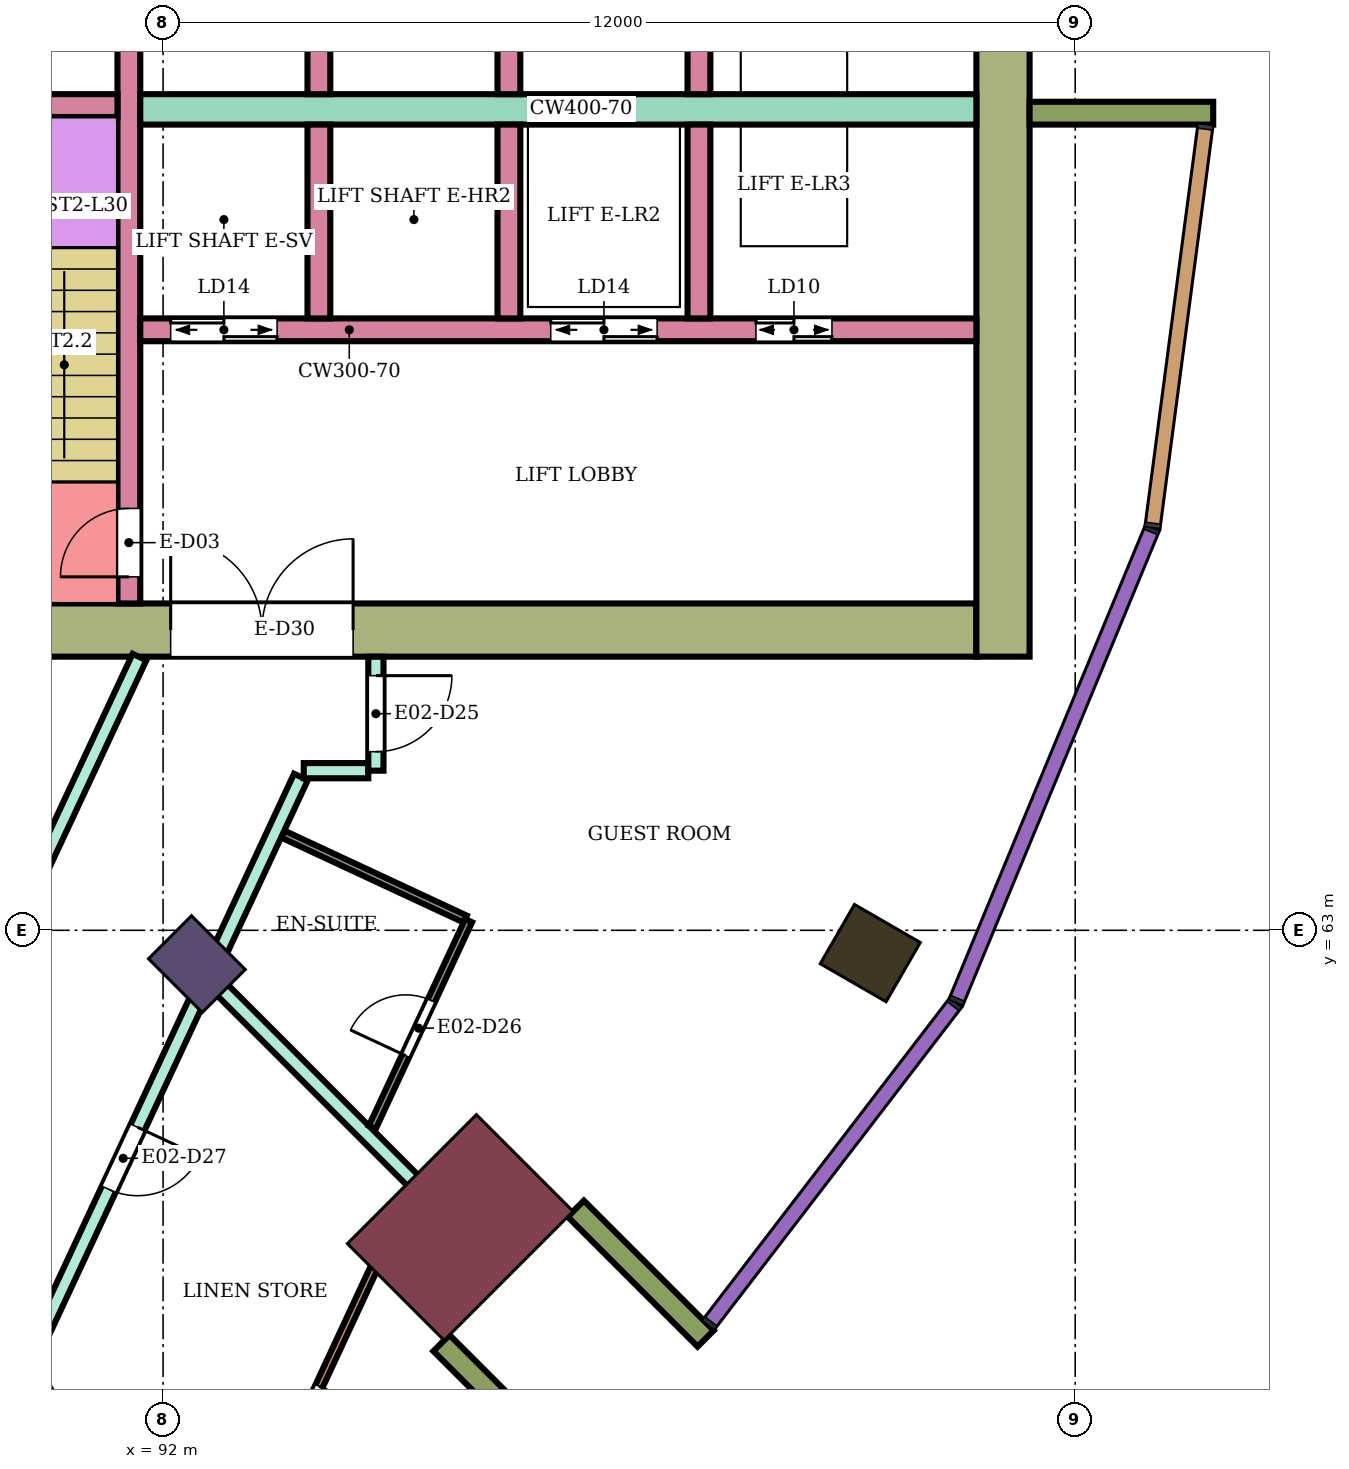
"""IFC4 building model, lengths in metres.
Left out: names, types, materials, properties, quantities, classifications, styles, units other than length and angle.
Written with IfcOpenShell. Run it as: python <this file> out.ifc"""

import sys

from ifc_helpers import new_model, si_unit, direction, frame, frame_2d, origin, origin_2d, place, context, subcontext, project, spatial, rectangle, extrude, element, fill, save


model = new_model("IFC4")
c1 = context("Model", 3, precision=1e-05, world=origin(), true_north=direction((0.0, 1.0)))
c2 = subcontext(c1, "Body", "Model", "MODEL_VIEW")
j1 = project(units=[si_unit("LENGTHUNIT", "METRE"), si_unit("PLANEANGLEUNIT", "RADIAN")], contexts=[c1])
p1 = place(None, origin())
s1 = spatial("IfcSite", under=j1, at=p1, CompositionType="ELEMENT")
p2 = place(p1, origin())
s2 = spatial("IfcBuilding", under=s1, at=p2, CompositionType="ELEMENT")
p3 = place(p2, frame((0.0, 0.0, 130.2)))
s3 = spatial("IfcBuildingStorey", under=s2, at=p3, CompositionType="ELEMENT", Elevation=130.2)
p4 = place(p3, frame((101.304, 62.7, 0.0), z_axis=(0.0, 0.0, 1.0), x_axis=(0.866025403784, -0.5, 0.0)))
e1 = element("IfcColumn", 1, at=p4, inside=s3, PredefinedType="COLUMN", context=c2, shape_type="SweptSolid", body=[
    extrude(rectangle(XDim=1.0, YDim=0.9, at=origin_2d()), origin(), (0.0, 0.0, 1.0), 3.9),
])
p5 = place(p3, frame((92.445, 62.555, 0.0), z_axis=(0.0, 0.0, 1.0), x_axis=(0.707106781187, -0.707106781187, 0.0)))
e2 = element("IfcColumn", 2, at=p5, inside=s3, PredefinedType="COLUMN", context=c2, shape_type="SweptSolid", body=[
    extrude(rectangle(XDim=1.0, YDim=0.8, at=origin_2d()), origin(), (0.0, 0.0, 1.0), 3.9),
])
p6 = place(p3, frame((95.91, 59.09, 0.0), z_axis=(0.0, 0.0, 1.0), x_axis=(0.707106781187, -0.707106781187, 0.0)))
e3 = element("IfcColumn", 3, at=p6, inside=s3, PredefinedType="COLUMN", context=c2, shape_type="SweptSolid", body=[
    extrude(rectangle(XDim=1.8, YDim=2.4, at=origin_2d()), origin(), (0.0, 0.0, 1.0), 3.9),
])
p7 = place(p3, frame((87.9, 66.95, 0.0), z_axis=(0.0, 0.0, 1.0), x_axis=(1.0, 0.0, 0.0)))
e4 = element("IfcWall", 4, at=p7, inside=s3, PredefinedType="SHEAR", context=c2, shape_type="SweptSolid", body=[
    extrude(rectangle(XDim=14.8, YDim=0.7, at=frame_2d((7.4, 0.0))), origin(), (0.0, 0.0, 1.0), 3.58),
])
p8 = place(p7, frame((4.2, 0.0, 0.0)))
e5 = element("IfcOpeningElement", 5, at=p8, cuts=e4, PredefinedType="OPENING", context=c2, shape_type="SweptSolid", body=[
    extrude(rectangle(XDim=2.4, YDim=2.4, at=frame_2d((1.2, 1.2))), frame((0.0, 0.36, 0.0), z_axis=(0.0, -1.0, 0.0), x_axis=(1.0, 0.0, 0.0)), (0.0, 0.0, 1.0), 0.72),
])
p9 = place(p3, frame((103.05, 66.6, 0.0), z_axis=(0.0, 0.0, 1.0), x_axis=(0.0, 1.0, 0.0)))
e6 = element("IfcWall", 6, at=p9, inside=s3, PredefinedType="SHEAR", context=c2, shape_type="SweptSolid", body=[
    extrude(rectangle(XDim=16.8, YDim=0.7, at=frame_2d((8.4, 0.0))), origin(), (0.0, 0.0, 1.0), 3.58),
])
p10 = place(p3, frame((91.55, 67.3, 0.0), z_axis=(0.0, 0.0, 1.0), x_axis=(0.0, 1.0, 0.0)))
e7 = element("IfcWall", 7, at=p10, inside=s3, PredefinedType="SHEAR", context=c2, shape_type="SweptSolid", body=[
    extrude(rectangle(XDim=7.7, YDim=0.3, at=frame_2d((3.85, 0.0))), origin(), (0.0, 0.0, 1.0), 3.58),
])
p11 = place(p10, frame((0.35, 0.0, 0.0)))
e8 = element("IfcOpeningElement", 8, at=p11, cuts=e7, PredefinedType="OPENING", context=c2, shape_type="SweptSolid", body=[
    extrude(rectangle(XDim=0.9, YDim=2.1, at=frame_2d((0.45, 1.05))), frame((0.0, 0.16, 0.0), z_axis=(0.0, -1.0, 0.0), x_axis=(1.0, 0.0, 0.0)), (0.0, 0.0, 1.0), 0.32),
])
p12 = place(p3, frame((88.35, 73.85, 0.0), z_axis=(0.0, 0.0, 1.0), x_axis=(1.0, 0.0, 0.0)))
e9 = element("IfcWall", 9, at=p12, inside=s3, PredefinedType="SHEAR", context=c2, shape_type="SweptSolid", body=[
    extrude(rectangle(XDim=3.05, YDim=0.3, at=frame_2d((1.525, 0.0))), origin(), (0.0, 0.0, 1.0), 3.58),
])
p13 = place(p3, frame((91.7, 73.8, 0.0), z_axis=(0.0, 0.0, 1.0), x_axis=(1.0, 0.0, 0.0)))
e10 = element("IfcWall", 10, at=p13, inside=s3, PredefinedType="SHEAR", context=c2, shape_type="SweptSolid", body=[
    extrude(rectangle(XDim=11.0, YDim=0.4, at=frame_2d((5.5, 0.0))), origin(), (0.0, 0.0, 1.0), 3.58),
])
p14 = place(p3, frame((91.7, 70.9, 0.0), z_axis=(0.0, 0.0, 1.0), x_axis=(1.0, 0.0, 0.0)))
e11 = element("IfcWall", 11, at=p14, inside=s3, PredefinedType="SHEAR", context=c2, shape_type="SweptSolid", body=[
    extrude(rectangle(XDim=11.0, YDim=0.3, at=frame_2d((5.5, 0.0))), origin(), (0.0, 0.0, 1.0), 3.58),
])
p15 = place(p14, frame((0.4, 0.0, 0.0)))
e12 = element("IfcOpeningElement", 12, at=p15, cuts=e11, PredefinedType="OPENING", context=c2, shape_type="SweptSolid", body=[
    extrude(rectangle(XDim=1.4, YDim=2.1, at=frame_2d((0.7, 1.05))), frame((0.0, 0.16, 0.0), z_axis=(0.0, -1.0, 0.0), x_axis=(1.0, 0.0, 0.0)), (0.0, 0.0, 1.0), 0.32),
])
p16 = place(p14, frame((5.4, 0.0, 0.0)))
e13 = element("IfcOpeningElement", 13, at=p16, cuts=e11, PredefinedType="OPENING", context=c2, shape_type="SweptSolid", body=[
    extrude(rectangle(XDim=1.4, YDim=2.1, at=frame_2d((0.7, 1.05))), frame((0.0, 0.16, 0.0), z_axis=(0.0, -1.0, 0.0), x_axis=(1.0, 0.0, 0.0)), (0.0, 0.0, 1.0), 0.32),
])
p17 = place(p14, frame((8.1, 0.0, 0.0)))
e14 = element("IfcOpeningElement", 14, at=p17, cuts=e11, PredefinedType="OPENING", context=c2, shape_type="SweptSolid", body=[
    extrude(rectangle(XDim=1.0, YDim=2.1, at=frame_2d((0.5, 1.05))), frame((0.0, 0.16, 0.0), z_axis=(0.0, -1.0, 0.0), x_axis=(1.0, 0.0, 0.0)), (0.0, 0.0, 1.0), 0.32),
])
for number, where, z_axis, x_axis in (
    (15, (94.05, 74.0, 0.0), (0.0, 0.0, 1.0), (0.0, 1.0, 0.0)),
    (16, (96.55, 74.0, 0.0), (0.0, 0.0, 1.0), (0.0, 1.0, 0.0)),
    (17, (99.05, 74.0, 0.0), (0.0, 0.0, 1.0), (0.0, 1.0, 0.0)),
    (18, (94.05, 71.05, 0.0), (0.0, 0.0, 1.0), (0.0, 1.0, 0.0)),
    (19, (96.55, 71.05, 0.0), (0.0, 0.0, 1.0), (0.0, 1.0, 0.0)),
    (20, (99.05, 71.05, 0.0), (0.0, 0.0, 1.0), (0.0, 1.0, 0.0)),
):
    element("IfcWall", number, at=place(p3, frame(where, z_axis=z_axis, x_axis=x_axis)), inside=s3, PredefinedType="SHEAR", context=c2, shape_type="SweptSolid", body=[
        extrude(rectangle(XDim=2.55, YDim=0.3, at=frame_2d((1.275, 0.0))), origin(), (0.0, 0.0, 1.0), 3.58),
    ])
for number, where, z_axis, x_axis in (
    (21, (103.4, 73.75, 0.0), (0.0, 0.0, 1.0), (1.0, 0.0, 0.0)),
    (22, (95.662, 57.57, 0.0), (0.0, 0.0, 1.0), (0.707, -0.707, 0.0)),
    (23, (97.43, 59.338, 0.0), (0.0, 0.0, 1.0), (0.707, -0.707, 0.0)),
):
    element("IfcWall", number, at=place(p3, frame(where, z_axis=z_axis, x_axis=x_axis)), inside=s3, PredefinedType="NOTDEFINED", context=c2, shape_type="SweptSolid", body=[
        extrude(rectangle(XDim=2.416, YDim=0.3, at=frame_2d((1.208, 0.0))), origin(), (0.0, 0.0, 1.0), 3.9),
    ])
p18 = place(p3, frame((88.502, 59.774, 0.0), z_axis=(0.0, 0.0, 1.0), x_axis=(0.423423307095, 0.905931952747, 0.0)))
e24 = element("IfcWall", 24, at=p18, inside=s3, PredefinedType="PARTITIONING", context=c2, shape_type="SweptSolid", body=[
    extrude(rectangle(XDim=7.529, YDim=0.2, at=frame_2d((3.764, 0.0))), origin(), (0.0, 0.0, 1.0), 3.45),
])
p19 = place(p3, frame((90.16, 57.396, 0.0), z_axis=(0.0, 0.0, 1.0), x_axis=(0.499848624781, -0.86611278267, 0.0)))
e25 = element("IfcWall", 25, at=p19, inside=s3, PredefinedType="PARTITIONING", context=c2, shape_type="SweptSolid", body=[
    extrude(rectangle(XDim=5.472, YDim=0.2, at=frame_2d((2.736, 0.0))), origin(), (0.0, 0.0, 1.0), 3.45),
])
p20 = place(p3, frame((90.346, 57.578, 0.0), z_axis=(0.0, 0.0, 1.0), x_axis=(0.422476720533, 0.906373775331, 0.0)))
e26 = element("IfcWall", 26, at=p20, inside=s3, PredefinedType="PARTITIONING", context=c2, shape_type="SweptSolid", body=[
    extrude(rectangle(XDim=8.208, YDim=0.2, at=frame_2d((4.104, 0.0))), origin(), (0.0, 0.0, 1.0), 3.45),
])
p21 = place(p20, frame((2.223, 0.0, 0.0)))
e27 = element("IfcOpeningElement", 27, at=p21, cuts=e26, PredefinedType="OPENING", context=c2, shape_type="SweptSolid", body=[
    extrude(rectangle(XDim=0.9, YDim=2.1, at=frame_2d((0.45, 1.05))), frame((0.0, 0.11, 0.0), z_axis=(0.0, -1.0, 0.0), x_axis=(1.0, 0.0, 0.0)), (0.0, 0.0, 1.0), 0.22),
])
p22 = place(p3, frame((92.692, 62.303, 0.0), z_axis=(0.0, 0.0, 1.0), x_axis=(0.706943936447, -0.707269588432, 0.0)))
e28 = element("IfcWall", 28, at=p22, inside=s3, PredefinedType="PARTITIONING", context=c2, shape_type="SweptSolid", body=[
    extrude(rectangle(XDim=5.248, YDim=0.2, at=frame_2d((2.624, 0.0))), origin(), (0.0, 0.0, 1.0), 3.45),
])
p23 = place(p3, frame((93.851, 65.1, 0.0), z_axis=(0.0, 0.0, 1.0), x_axis=(1.0, 0.0, 0.0)))
e29 = element("IfcWall", 29, at=p23, inside=s3, PredefinedType="PARTITIONING", context=c2, shape_type="SweptSolid", body=[
    extrude(rectangle(XDim=0.849, YDim=0.2, at=frame_2d((0.424, 0.0))), origin(), (0.0, 0.0, 1.0), 3.45),
])
p24 = place(p3, frame((94.8, 65.1, 0.0), z_axis=(0.0, 0.0, 1.0), x_axis=(0.0, 1.0, 0.0)))
e30 = element("IfcWall", 30, at=p24, inside=s3, PredefinedType="PARTITIONING", context=c2, shape_type="SweptSolid", body=[
    extrude(rectangle(XDim=1.499, YDim=0.2, at=frame_2d((0.75, 0.0))), origin(), (0.0, 0.0, 1.0), 3.45),
])
p25 = place(p24, frame((0.25, 0.0, 0.0)))
e31 = element("IfcOpeningElement", 31, at=p25, cuts=e30, PredefinedType="OPENING", context=c2, shape_type="SweptSolid", body=[
    extrude(rectangle(XDim=1.0, YDim=2.1, at=frame_2d((0.5, 1.05))), frame((0.0, 0.11, 0.0), z_axis=(0.0, -1.0, 0.0), x_axis=(1.0, 0.0, 0.0)), (0.0, 0.0, 1.0), 0.22),
])
p26 = place(p3, frame((92.477, 53.619, 0.0), z_axis=(0.0, 0.0, 1.0), x_axis=(0.421913254756, 0.90663620348, 0.0)))
e32 = element("IfcWall", 32, at=p26, inside=s3, PredefinedType="PARTITIONING", context=c2, shape_type="SweptSolid", body=[
    extrude(rectangle(XDim=6.573, YDim=0.1, at=frame_2d((3.287, 0.0))), origin(), (0.0, 0.0, 1.0), 2.68),
])
p27 = place(p26, frame((2.831, 0.0, 0.0)))
e33 = element("IfcOpeningElement", 33, at=p27, cuts=e32, PredefinedType="OPENING", context=c2, shape_type="SweptSolid", body=[
    extrude(rectangle(XDim=0.9, YDim=2.1, at=frame_2d((0.45, 1.05))), frame((0.0, 0.06, 0.0), z_axis=(0.0, -1.0, 0.0), x_axis=(1.0, 0.0, 0.0)), (0.0, 0.0, 1.0), 0.12),
])
p28 = place(p3, frame((93.582, 64.263, 0.0), z_axis=(0.0, 0.0, 1.0), x_axis=(0.906494794209, -0.422216991691, 0.0)))
e34 = element("IfcWall", 34, at=p28, inside=s3, PredefinedType="PARTITIONING", context=c2, shape_type="SweptSolid", body=[
    extrude(rectangle(XDim=2.64, YDim=0.1, at=frame_2d((1.32, 0.0))), origin(), (0.0, 0.0, 1.0), 3.45),
])
p29 = place(p3, frame((94.753, 60.408, 0.0), z_axis=(0.0, 0.0, 1.0), x_axis=(0.422435455794, 0.906393008406, 0.0)))
e35 = element("IfcWall", 35, at=p29, inside=s3, PredefinedType="PARTITIONING", context=c2, shape_type="SweptSolid", body=[
    extrude(rectangle(XDim=3.0, YDim=0.1, at=frame_2d((1.5, 0.0))), origin(), (0.0, 0.0, 1.0), 3.45),
])
p30 = place(p29, frame((1.04, 0.0, 0.0)))
e36 = element("IfcOpeningElement", 36, at=p30, cuts=e35, PredefinedType="OPENING", context=c2, shape_type="SweptSolid", body=[
    extrude(rectangle(XDim=0.8, YDim=2.1, at=frame_2d((0.4, 1.05))), frame((0.0, 0.06, 0.0), z_axis=(0.0, -1.0, 0.0), x_axis=(1.0, 0.0, 0.0)), (0.0, 0.0, 1.0), 0.12),
])
p31 = place(p25, frame((1.0, 0.0, 0.0), z_axis=(0.0, 0.0, 1.0), x_axis=(-1.0, 0.0, 0.0)))
e37 = element("IfcDoor", 37, at=p31, inside=s3, OperationType="SINGLE_SWING_LEFT", PredefinedType="DOOR", context=c2, shape_type="SweptSolid", body=[
    extrude(rectangle(XDim=1.0, YDim=2.1, at=frame_2d((0.5, 1.05))), frame((0.0, 0.025, 0.0), z_axis=(0.0, -1.0, 0.0), x_axis=(1.0, 0.0, 0.0)), (0.0, 0.0, 1.0), 0.05),
])
fill(e31, e37)
p32 = place(p30, origin())
e38 = element("IfcDoor", 38, at=p32, inside=s3, OperationType="SINGLE_SWING_LEFT", PredefinedType="DOOR", context=c2, shape_type="SweptSolid", body=[
    extrude(rectangle(XDim=0.8, YDim=2.1, at=frame_2d((0.4, 1.05))), frame((0.0, 0.025, 0.0), z_axis=(0.0, -1.0, 0.0), x_axis=(1.0, 0.0, 0.0)), (0.0, 0.0, 1.0), 0.05),
])
fill(e36, e38)
p33 = place(p21, frame((0.9, 0.0, 0.0), z_axis=(0.0, 0.0, 1.0), x_axis=(-1.0, 0.0, 0.0)))
e39 = element("IfcDoor", 39, at=p33, inside=s3, OperationType="SINGLE_SWING_LEFT", PredefinedType="DOOR", context=c2, shape_type="SweptSolid", body=[
    extrude(rectangle(XDim=0.9, YDim=2.1, at=frame_2d((0.45, 1.05))), frame((0.0, 0.025, 0.0), z_axis=(0.0, -1.0, 0.0), x_axis=(1.0, 0.0, 0.0)), (0.0, 0.0, 1.0), 0.05),
])
fill(e27, e39)
p34 = place(p27, frame((0.9, 0.0, 0.0), z_axis=(0.0, 0.0, 1.0), x_axis=(-1.0, 0.0, 0.0)))
e40 = element("IfcDoor", 40, at=p34, inside=s3, OperationType="SINGLE_SWING_LEFT", PredefinedType="DOOR", context=c2, shape_type="SweptSolid", body=[
    extrude(rectangle(XDim=0.9, YDim=2.1, at=frame_2d((0.45, 1.05))), frame((0.0, 0.025, 0.0), z_axis=(0.0, -1.0, 0.0), x_axis=(1.0, 0.0, 0.0)), (0.0, 0.0, 1.0), 0.05),
])
fill(e33, e40)
p35 = place(p11, origin())
e41 = element("IfcDoor", 41, at=p35, inside=s3, OperationType="SINGLE_SWING_LEFT", PredefinedType="DOOR", context=c2, shape_type="SweptSolid", body=[
    extrude(rectangle(XDim=0.9, YDim=2.1, at=frame_2d((0.45, 1.05))), frame((0.0, 0.025, 0.0), z_axis=(0.0, -1.0, 0.0), x_axis=(1.0, 0.0, 0.0)), (0.0, 0.0, 1.0), 0.05),
])
fill(e8, e41)
p36 = place(p15, origin())
e42 = element("IfcDoor", 42, at=p36, inside=s3, OperationType="DOUBLE_DOOR_SLIDING", PredefinedType="DOOR", context=c2, shape_type="SweptSolid", body=[
    extrude(rectangle(XDim=1.4, YDim=2.1, at=frame_2d((0.7, 1.05))), frame((0.0, 0.025, 0.0), z_axis=(0.0, -1.0, 0.0), x_axis=(1.0, 0.0, 0.0)), (0.0, 0.0, 1.0), 0.05),
])
fill(e12, e42)
p37 = place(p16, origin())
e43 = element("IfcDoor", 43, at=p37, inside=s3, OperationType="DOUBLE_DOOR_SLIDING", PredefinedType="DOOR", context=c2, shape_type="SweptSolid", body=[
    extrude(rectangle(XDim=1.4, YDim=2.1, at=frame_2d((0.7, 1.05))), frame((0.0, 0.025, 0.0), z_axis=(0.0, -1.0, 0.0), x_axis=(1.0, 0.0, 0.0)), (0.0, 0.0, 1.0), 0.05),
])
fill(e13, e43)
p38 = place(p17, origin())
e44 = element("IfcDoor", 44, at=p38, inside=s3, OperationType="DOUBLE_DOOR_SLIDING", PredefinedType="DOOR", context=c2, shape_type="SweptSolid", body=[
    extrude(rectangle(XDim=1.0, YDim=2.1, at=frame_2d((0.5, 1.05))), frame((0.0, 0.025, 0.0), z_axis=(0.0, -1.0, 0.0), x_axis=(1.0, 0.0, 0.0)), (0.0, 0.0, 1.0), 0.05),
])
fill(e14, e44)
p39 = place(p8, origin())
e45 = element("IfcDoor", 45, at=p39, inside=s3, OperationType="DOUBLE_DOOR_SINGLE_SWING", PredefinedType="DOOR", context=c2, shape_type="SweptSolid", body=[
    extrude(rectangle(XDim=2.4, YDim=2.4, at=frame_2d((1.2, 1.2))), frame((0.0, 0.025, 0.0), z_axis=(0.0, -1.0, 0.0), x_axis=(1.0, 0.0, 0.0)), (0.0, 0.0, 1.0), 0.05),
])
fill(e5, e45)
save(model, sys.argv[1])
